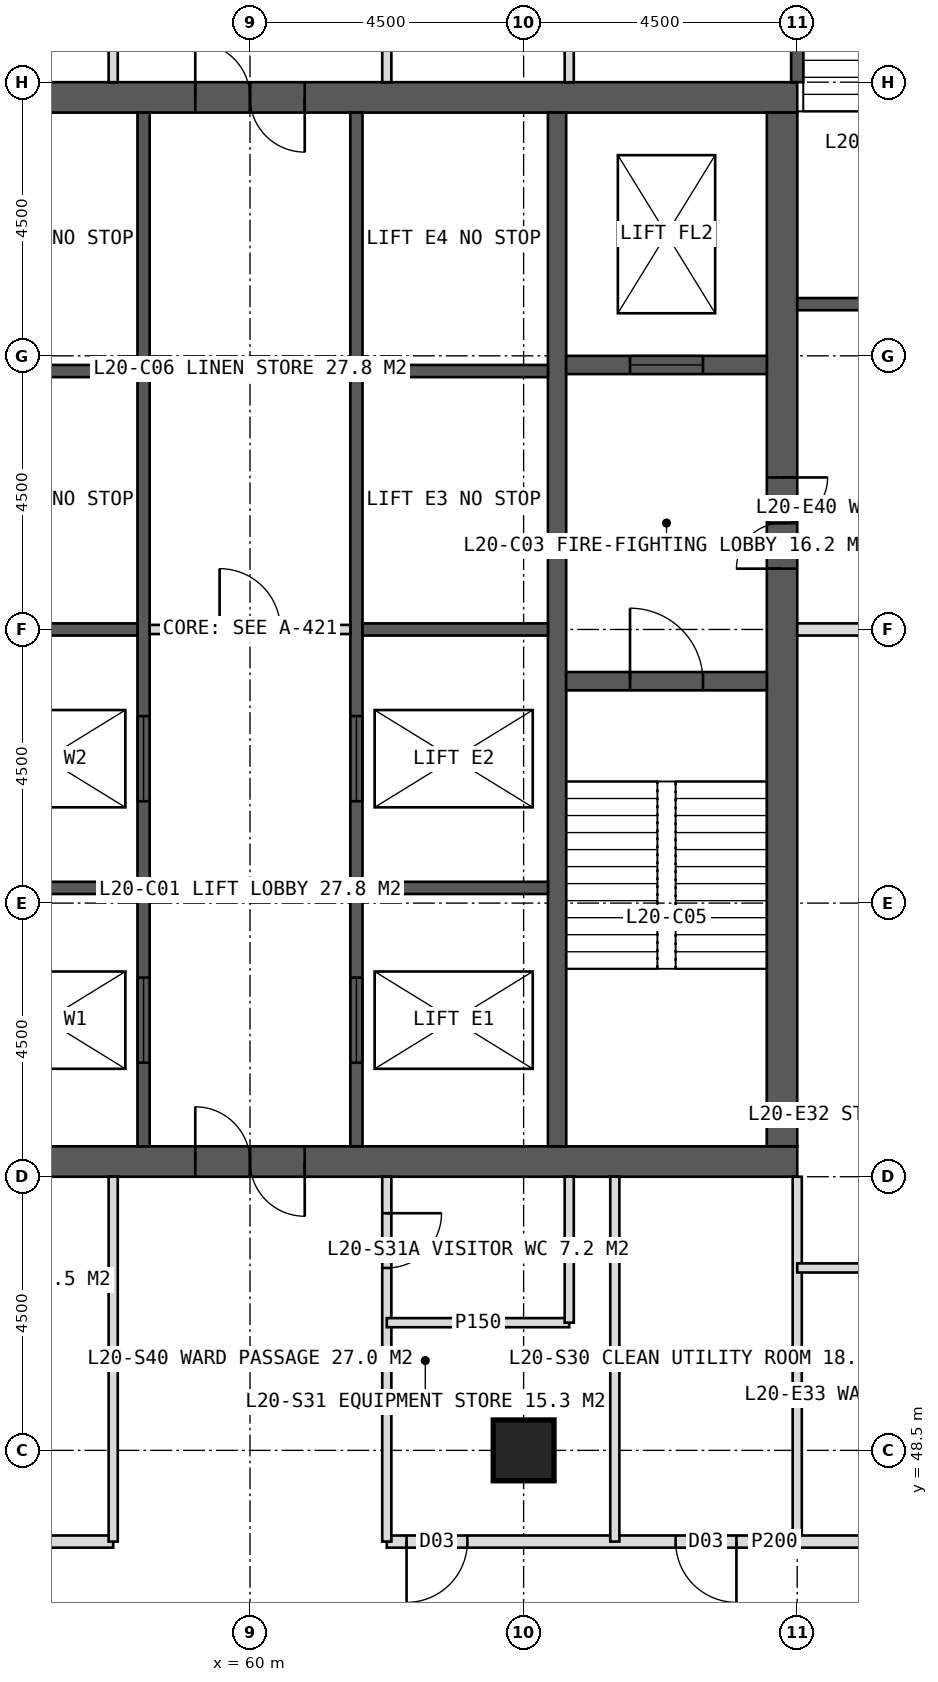
"""IFC4 building model, lengths in metres.
Left out: names, types, materials, properties, quantities, classifications, styles, units other than length and angle.
Written with IfcOpenShell. Run it as: python <this file> out.ifc"""

import sys

from ifc_helpers import new_model, si_unit, direction, frame, frame_2d, origin, origin_2d, place, context, subcontext, project, spatial, rectangle, hollow_rectangle, extrude, element, fill, save


model = new_model("IFC4")
c1 = context("Model", 3, precision=1e-05, world=origin(), true_north=direction((0.0, 1.0)))
c2 = subcontext(c1, "Body", "Model", "MODEL_VIEW")
j1 = project(units=[si_unit("LENGTHUNIT", "METRE"), si_unit("PLANEANGLEUNIT", "RADIAN")], contexts=[c1])
p1 = place(None, origin())
s1 = spatial("IfcSite", under=j1, at=p1, CompositionType="ELEMENT")
p2 = place(p1, origin())
s2 = spatial("IfcBuilding", under=s1, at=p2, CompositionType="ELEMENT")
p3 = place(p2, frame((0.0, 0.0, 87.0)))
s3 = spatial("IfcBuildingStorey", under=s2, at=p3, CompositionType="ELEMENT", Elevation=87.0)
p4 = place(p3, frame((51.0, 70.75, 0.0), z_axis=(0.0, 0.0, 1.0), x_axis=(1.0, 0.0, 0.0)))
e1 = element("IfcWall", 1, at=p4, inside=s3, PredefinedType="SHEAR", context=c2, shape_type="SweptSolid", body=[
    extrude(rectangle(XDim=18.0, YDim=0.5, at=frame_2d((9.0, 0.0))), origin(), (0.0, 0.0, 1.0), 4.0),
])
p5 = place(p4, frame((8.1, 0.0, 0.0)))
e2 = element("IfcOpeningElement", 2, at=p5, cuts=e1, PredefinedType="OPENING", context=c2, shape_type="SweptSolid", body=[
    extrude(rectangle(XDim=1.8, YDim=2.2, at=frame_2d((0.9, 1.1))), frame((0.0, 0.26, 0.0), z_axis=(0.0, -1.0, 0.0), x_axis=(1.0, 0.0, 0.0)), (0.0, 0.0, 1.0), 0.52),
])
p6 = place(p3, frame((51.0, 53.25, 0.0), z_axis=(0.0, 0.0, 1.0), x_axis=(1.0, 0.0, 0.0)))
e3 = element("IfcWall", 3, at=p6, inside=s3, PredefinedType="SHEAR", context=c2, shape_type="SweptSolid", body=[
    extrude(rectangle(XDim=18.0, YDim=0.5, at=frame_2d((9.0, 0.0))), origin(), (0.0, 0.0, 1.0), 4.0),
])
p7 = place(p6, frame((8.1, 0.0, 0.0)))
e4 = element("IfcOpeningElement", 4, at=p7, cuts=e3, PredefinedType="OPENING", context=c2, shape_type="SweptSolid", body=[
    extrude(rectangle(XDim=1.8, YDim=2.2, at=frame_2d((0.9, 1.1))), frame((0.0, 0.26, 0.0), z_axis=(0.0, -1.0, 0.0), x_axis=(1.0, 0.0, 0.0)), (0.0, 0.0, 1.0), 0.52),
])
p8 = place(p3, frame((68.75, 53.5, 0.0), z_axis=(0.0, 0.0, 1.0), x_axis=(0.0, 1.0, 0.0)))
e5 = element("IfcWall", 5, at=p8, inside=s3, PredefinedType="SHEAR", context=c2, shape_type="SweptSolid", body=[
    extrude(rectangle(XDim=17.0, YDim=0.5, at=frame_2d((8.5, 0.0))), origin(), (0.0, 0.0, 1.0), 4.0),
])
p9 = place(p8, frame((9.5, 0.0, 0.0)))
e6 = element("IfcOpeningElement", 6, at=p9, cuts=e5, PredefinedType="OPENING", context=c2, shape_type="SweptSolid", body=[
    extrude(rectangle(XDim=1.5, YDim=2.2, at=frame_2d((0.75, 1.1))), frame((0.0, 0.26, 0.0), z_axis=(0.0, -1.0, 0.0), x_axis=(1.0, 0.0, 0.0)), (0.0, 0.0, 1.0), 0.52),
])
p10 = place(p3, frame((65.05, 53.5, 0.0), z_axis=(0.0, 0.0, 1.0), x_axis=(0.0, 1.0, 0.0)))
e7 = element("IfcWall", 7, at=p10, inside=s3, PredefinedType="SHEAR", context=c2, shape_type="SweptSolid", body=[
    extrude(rectangle(XDim=17.0, YDim=0.3, at=frame_2d((8.5, 0.0))), origin(), (0.0, 0.0, 1.0), 4.0),
])
p11 = place(p3, frame((58.25, 53.5, 0.0), z_axis=(0.0, 0.0, 1.0), x_axis=(0.0, 1.0, 0.0)))
e8 = element("IfcWall", 8, at=p11, inside=s3, PredefinedType="SHEAR", context=c2, shape_type="SweptSolid", body=[
    extrude(rectangle(XDim=17.0, YDim=0.2, at=frame_2d((8.5, 0.0))), origin(), (0.0, 0.0, 1.0), 4.0),
])
p12 = place(p11, frame((1.375, 0.0, 0.0)))
e9 = element("IfcOpeningElement", 9, at=p12, cuts=e8, PredefinedType="OPENING", context=c2, shape_type="SweptSolid", body=[
    extrude(rectangle(XDim=1.4, YDim=2.2, at=frame_2d((0.7, 1.1))), frame((0.0, 0.11, 0.0), z_axis=(0.0, -1.0, 0.0), x_axis=(1.0, 0.0, 0.0)), (0.0, 0.0, 1.0), 0.22),
])
p13 = place(p11, frame((5.675, 0.0, 0.0)))
e10 = element("IfcOpeningElement", 10, at=p13, cuts=e8, PredefinedType="OPENING", context=c2, shape_type="SweptSolid", body=[
    extrude(rectangle(XDim=1.4, YDim=2.2, at=frame_2d((0.7, 1.1))), frame((0.0, 0.11, 0.0), z_axis=(0.0, -1.0, 0.0), x_axis=(1.0, 0.0, 0.0)), (0.0, 0.0, 1.0), 0.22),
])
p14 = place(p3, frame((61.75, 53.5, 0.0), z_axis=(0.0, 0.0, 1.0), x_axis=(0.0, 1.0, 0.0)))
e11 = element("IfcWall", 11, at=p14, inside=s3, PredefinedType="SHEAR", context=c2, shape_type="SweptSolid", body=[
    extrude(rectangle(XDim=17.0, YDim=0.2, at=frame_2d((8.5, 0.0))), origin(), (0.0, 0.0, 1.0), 4.0),
])
p15 = place(p14, frame((1.375, 0.0, 0.0)))
e12 = element("IfcOpeningElement", 12, at=p15, cuts=e11, PredefinedType="OPENING", context=c2, shape_type="SweptSolid", body=[
    extrude(rectangle(XDim=1.4, YDim=2.2, at=frame_2d((0.7, 1.1))), frame((0.0, 0.11, 0.0), z_axis=(0.0, -1.0, 0.0), x_axis=(1.0, 0.0, 0.0)), (0.0, 0.0, 1.0), 0.22),
])
p16 = place(p14, frame((5.675, 0.0, 0.0)))
e13 = element("IfcOpeningElement", 13, at=p16, cuts=e11, PredefinedType="OPENING", context=c2, shape_type="SweptSolid", body=[
    extrude(rectangle(XDim=1.4, YDim=2.2, at=frame_2d((0.7, 1.1))), frame((0.0, 0.11, 0.0), z_axis=(0.0, -1.0, 0.0), x_axis=(1.0, 0.0, 0.0)), (0.0, 0.0, 1.0), 0.22),
])
for number, where, z_axis, x_axis in (
    (14, (55.1, 57.75, 0.0), (0.0, 0.0, 1.0), (1.0, 0.0, 0.0)),
    (15, (61.85, 57.75, 0.0), (0.0, 0.0, 1.0), (1.0, 0.0, 0.0)),
    (16, (55.1, 62.0, 0.0), (0.0, 0.0, 1.0), (1.0, 0.0, 0.0)),
    (17, (61.85, 62.0, 0.0), (0.0, 0.0, 1.0), (1.0, 0.0, 0.0)),
    (18, (55.1, 66.25, 0.0), (0.0, 0.0, 1.0), (1.0, 0.0, 0.0)),
    (19, (61.85, 66.25, 0.0), (0.0, 0.0, 1.0), (1.0, 0.0, 0.0)),
):
    element("IfcWall", number, at=place(p3, frame(where, z_axis=z_axis, x_axis=x_axis)), inside=s3, PredefinedType="SHEAR", context=c2, shape_type="SweptSolid", body=[
        extrude(rectangle(XDim=3.05, YDim=0.2, at=frame_2d((1.525, 0.0))), origin(), (0.0, 0.0, 1.0), 4.0),
    ])
p17 = place(p3, frame((65.2, 61.15, 0.0), z_axis=(0.0, 0.0, 1.0), x_axis=(1.0, 0.0, 0.0)))
e20 = element("IfcWall", 20, at=p17, inside=s3, PredefinedType="SHEAR", context=c2, shape_type="SweptSolid", body=[
    extrude(rectangle(XDim=3.3, YDim=0.3, at=frame_2d((1.65, 0.0))), origin(), (0.0, 0.0, 1.0), 4.0),
])
p18 = place(p17, frame((1.05, 0.0, 0.0)))
e21 = element("IfcOpeningElement", 21, at=p18, cuts=e20, PredefinedType="OPENING", context=c2, shape_type="SweptSolid", body=[
    extrude(rectangle(XDim=1.2, YDim=2.1, at=frame_2d((0.6, 1.05))), frame((0.0, 0.16, 0.0), z_axis=(0.0, -1.0, 0.0), x_axis=(1.0, 0.0, 0.0)), (0.0, 0.0, 1.0), 0.32),
])
p19 = place(p3, frame((65.2, 66.35, 0.0), z_axis=(0.0, 0.0, 1.0), x_axis=(1.0, 0.0, 0.0)))
e22 = element("IfcWall", 22, at=p19, inside=s3, PredefinedType="SHEAR", context=c2, shape_type="SweptSolid", body=[
    extrude(rectangle(XDim=3.3, YDim=0.3, at=frame_2d((1.65, 0.0))), origin(), (0.0, 0.0, 1.0), 4.0),
])
p20 = place(p19, frame((1.05, 0.0, 0.0)))
e23 = element("IfcOpeningElement", 23, at=p20, cuts=e22, PredefinedType="OPENING", context=c2, shape_type="SweptSolid", body=[
    extrude(rectangle(XDim=1.2, YDim=2.2, at=frame_2d((0.6, 1.1))), frame((0.0, 0.16, 0.0), z_axis=(0.0, -1.0, 0.0), x_axis=(1.0, 0.0, 0.0)), (0.0, 0.0, 1.0), 0.32),
])
p21 = place(p3, frame((64.5, 48.5, 0.0), z_axis=(0.0, 0.0, 1.0), x_axis=(1.0, 0.0, 0.0)))
e24 = element("IfcColumn", 24, at=p21, inside=s3, PredefinedType="COLUMN", context=c2, shape_type="SweptSolid", body=[
    extrude(hollow_rectangle(XDim=1.0, YDim=1.0, WallThickness=0.1, at=origin_2d()), origin(), (0.0, 0.0, 1.0), 4.0),
])
p22 = place(p3, frame((57.75, 71.0, 0.0), z_axis=(0.0, 0.0, 1.0), x_axis=(0.0, 1.0, 0.0)))
e25 = element("IfcWall", 25, at=p22, inside=s3, PredefinedType="PARTITIONING", context=c2, shape_type="SweptSolid", body=[
    extrude(rectangle(XDim=6.0, YDim=0.15, at=frame_2d((3.0, 0.0))), origin(), (0.0, 0.0, 1.0), 3.75),
])
p23 = place(p22, frame((0.6, 0.0, 0.0)))
e26 = element("IfcOpeningElement", 26, at=p23, cuts=e25, PredefinedType="OPENING", context=c2, shape_type="SweptSolid", body=[
    extrude(rectangle(XDim=0.9, YDim=2.1, at=frame_2d((0.45, 1.05))), frame((0.0, 0.085, 0.0), z_axis=(0.0, -1.0, 0.0), x_axis=(1.0, 0.0, 0.0)), (0.0, 0.0, 1.0), 0.17),
])
p24 = place(p3, frame((62.25, 71.0, 0.0), z_axis=(0.0, 0.0, 1.0), x_axis=(0.0, 1.0, 0.0)))
e27 = element("IfcWall", 27, at=p24, inside=s3, PredefinedType="PARTITIONING", context=c2, shape_type="SweptSolid", body=[
    extrude(rectangle(XDim=6.0, YDim=0.15, at=frame_2d((3.0, 0.0))), origin(), (0.0, 0.0, 1.0), 3.75),
])
p25 = place(p24, frame((0.6, 0.0, 0.0)))
e28 = element("IfcOpeningElement", 28, at=p25, cuts=e27, PredefinedType="OPENING", context=c2, shape_type="SweptSolid", body=[
    extrude(rectangle(XDim=0.9, YDim=2.1, at=frame_2d((0.45, 1.05))), frame((0.0, 0.085, 0.0), z_axis=(0.0, -1.0, 0.0), x_axis=(1.0, 0.0, 0.0)), (0.0, 0.0, 1.0), 0.17),
])
p26 = place(p3, frame((65.25, 71.0, 0.0), z_axis=(0.0, 0.0, 1.0), x_axis=(0.0, 1.0, 0.0)))
e29 = element("IfcWall", 29, at=p26, inside=s3, PredefinedType="PARTITIONING", context=c2, shape_type="SweptSolid", body=[
    extrude(rectangle(XDim=2.4, YDim=0.15, at=frame_2d((1.2, 0.0))), origin(), (0.0, 0.0, 1.0), 3.75),
])
p27 = place(p3, frame((69.0, 53.0, 0.0), z_axis=(0.0, 0.0, 1.0), x_axis=(0.0, -1.0, 0.0)))
e30 = element("IfcWall", 30, at=p27, inside=s3, PredefinedType="PARTITIONING", context=c2, shape_type="SweptSolid", body=[
    extrude(rectangle(XDim=6.0, YDim=0.15, at=frame_2d((3.0, 0.0))), origin(), (0.0, 0.0, 1.0), 3.75),
])
p28 = place(p3, frame((75.0, 47.0, 0.0), z_axis=(0.0, 0.0, 1.0), x_axis=(-1.0, 0.0, 0.0)))
e31 = element("IfcWall", 31, at=p28, inside=s3, PredefinedType="PARTITIONING", context=c2, shape_type="SweptSolid", body=[
    extrude(rectangle(XDim=12.75, YDim=0.2, at=frame_2d((6.375, 0.0))), origin(), (0.0, 0.0, 1.0), 3.75),
])
p29 = place(p28, frame((7.0, 0.0, 0.0)))
e32 = element("IfcOpeningElement", 32, at=p29, cuts=e31, PredefinedType="OPENING", context=c2, shape_type="SweptSolid", body=[
    extrude(rectangle(XDim=1.0, YDim=2.1, at=frame_2d((0.5, 1.05))), frame((0.0, 0.11, 0.0), z_axis=(0.0, -1.0, 0.0), x_axis=(1.0, 0.0, 0.0)), (0.0, 0.0, 1.0), 0.22),
])
p30 = place(p28, frame((11.425, 0.0, 0.0)))
e33 = element("IfcOpeningElement", 33, at=p30, cuts=e31, PredefinedType="OPENING", context=c2, shape_type="SweptSolid", body=[
    extrude(rectangle(XDim=1.0, YDim=2.1, at=frame_2d((0.5, 1.05))), frame((0.0, 0.11, 0.0), z_axis=(0.0, -1.0, 0.0), x_axis=(1.0, 0.0, 0.0)), (0.0, 0.0, 1.0), 0.22),
])
p31 = place(p3, frame((57.75, 47.0, 0.0), z_axis=(0.0, 0.0, 1.0), x_axis=(-1.0, 0.0, 0.0)))
e34 = element("IfcWall", 34, at=p31, inside=s3, PredefinedType="PARTITIONING", context=c2, shape_type="SweptSolid", body=[
    extrude(rectangle(XDim=12.75, YDim=0.2, at=frame_2d((6.375, 0.0))), origin(), (0.0, 0.0, 1.0), 3.75),
])
p32 = place(p31, frame((3.55, 0.0, 0.0)))
e35 = element("IfcOpeningElement", 35, at=p32, cuts=e34, PredefinedType="OPENING", context=c2, shape_type="SweptSolid", body=[
    extrude(rectangle(XDim=1.0, YDim=2.1, at=frame_2d((0.5, 1.05))), frame((0.0, 0.11, 0.0), z_axis=(0.0, -1.0, 0.0), x_axis=(1.0, 0.0, 0.0)), (0.0, 0.0, 1.0), 0.22),
])
p33 = place(p31, frame((8.5, 0.0, 0.0)))
e36 = element("IfcOpeningElement", 36, at=p33, cuts=e34, PredefinedType="OPENING", context=c2, shape_type="SweptSolid", body=[
    extrude(rectangle(XDim=1.0, YDim=2.1, at=frame_2d((0.5, 1.05))), frame((0.0, 0.11, 0.0), z_axis=(0.0, -1.0, 0.0), x_axis=(1.0, 0.0, 0.0)), (0.0, 0.0, 1.0), 0.22),
])
p34 = place(p3, frame((62.25, 53.0, 0.0), z_axis=(0.0, 0.0, 1.0), x_axis=(0.0, -1.0, 0.0)))
e37 = element("IfcWall", 37, at=p34, inside=s3, PredefinedType="PARTITIONING", context=c2, shape_type="SweptSolid", body=[
    extrude(rectangle(XDim=6.0, YDim=0.15, at=frame_2d((3.0, 0.0))), origin(), (0.0, 0.0, 1.0), 3.75),
])
p35 = place(p34, frame((0.6, 0.0, 0.0)))
e38 = element("IfcOpeningElement", 38, at=p35, cuts=e37, PredefinedType="OPENING", context=c2, shape_type="SweptSolid", body=[
    extrude(rectangle(XDim=0.9, YDim=2.1, at=frame_2d((0.45, 1.05))), frame((0.0, 0.085, 0.0), z_axis=(0.0, -1.0, 0.0), x_axis=(1.0, 0.0, 0.0)), (0.0, 0.0, 1.0), 0.17),
])
for number, where, z_axis, x_axis in (
    (39, (57.75, 53.0, 0.0), (0.0, 0.0, 1.0), (0.0, -1.0, 0.0)),
    (40, (66.0, 53.0, 0.0), (0.0, 0.0, 1.0), (0.0, -1.0, 0.0)),
):
    element("IfcWall", number, at=place(p3, frame(where, z_axis=z_axis, x_axis=x_axis)), inside=s3, PredefinedType="PARTITIONING", context=c2, shape_type="SweptSolid", body=[
        extrude(rectangle(XDim=6.0, YDim=0.15, at=frame_2d((3.0, 0.0))), origin(), (0.0, 0.0, 1.0), 3.75),
    ])
p36 = place(p3, frame((65.25, 50.6, 0.0), z_axis=(0.0, 0.0, 1.0), x_axis=(-1.0, 0.0, 0.0)))
e41 = element("IfcWall", 41, at=p36, inside=s3, PredefinedType="PARTITIONING", context=c2, shape_type="SweptSolid", body=[
    extrude(rectangle(XDim=3.0, YDim=0.15, at=frame_2d((1.5, 0.0))), origin(), (0.0, 0.0, 1.0), 3.75),
])
p37 = place(p3, frame((65.25, 53.0, 0.0), z_axis=(0.0, 0.0, 1.0), x_axis=(0.0, -1.0, 0.0)))
e42 = element("IfcWall", 42, at=p37, inside=s3, PredefinedType="PARTITIONING", context=c2, shape_type="SweptSolid", body=[
    extrude(rectangle(XDim=2.4, YDim=0.15, at=frame_2d((1.2, 0.0))), origin(), (0.0, 0.0, 1.0), 3.75),
])
p38 = place(p3, frame((69.0, 62.0, 0.0), z_axis=(0.0, 0.0, 1.0), x_axis=(1.0, 0.0, 0.0)))
e43 = element("IfcWall", 43, at=p38, inside=s3, PredefinedType="SOLIDWALL", context=c2, shape_type="SweptSolid", body=[
    extrude(rectangle(XDim=6.0, YDim=0.2, at=frame_2d((3.0, 0.0))), origin(), (0.0, 0.0, 1.0), 2.75),
])
p39 = place(p3, frame((69.0, 51.5, 0.0), z_axis=(0.0, 0.0, 1.0), x_axis=(1.0, 0.0, 0.0)))
e44 = element("IfcWall", 44, at=p39, inside=s3, PredefinedType="PARTITIONING", context=c2, shape_type="SweptSolid", body=[
    extrude(rectangle(XDim=6.0, YDim=0.15, at=frame_2d((3.0, 0.0))), origin(), (0.0, 0.0, 1.0), 3.75),
])
p40 = place(p3, frame((58.35, 62.0, 0.0), z_axis=(0.0, 0.0, 1.0), x_axis=(1.0, 0.0, 0.0)))
e45 = element("IfcWall", 45, at=p40, inside=s3, PredefinedType="PARTITIONING", context=c2, shape_type="SweptSolid", body=[
    extrude(rectangle(XDim=3.3, YDim=0.15, at=frame_2d((1.65, 0.0))), origin(), (0.0, 0.0, 1.0), 3.75),
])
p41 = place(p40, frame((1.15, 0.0, 0.0)))
e46 = element("IfcOpeningElement", 46, at=p41, cuts=e45, PredefinedType="OPENING", context=c2, shape_type="SweptSolid", body=[
    extrude(rectangle(XDim=1.0, YDim=2.1, at=frame_2d((0.5, 1.05))), frame((0.0, 0.085, 0.0), z_axis=(0.0, -1.0, 0.0), x_axis=(1.0, 0.0, 0.0)), (0.0, 0.0, 1.0), 0.17),
])
p42 = place(p3, frame((69.0, 71.0, 0.0), z_axis=(0.0, 0.0, 1.0), x_axis=(0.0, 1.0, 0.0)))
e47 = element("IfcWall", 47, at=p42, inside=s3, PredefinedType="SOLIDWALL", context=c2, shape_type="SweptSolid", body=[
    extrude(rectangle(XDim=4.1, YDim=0.2, at=frame_2d((2.05, 0.0))), origin(), (0.0, 0.0, 1.0), 3.75),
])
p43 = place(p3, frame((69.0, 67.35, 0.0), z_axis=(0.0, 0.0, 1.0), x_axis=(1.0, 0.0, 0.0)))
e48 = element("IfcWall", 48, at=p43, inside=s3, PredefinedType="SOLIDWALL", context=c2, shape_type="SweptSolid", body=[
    extrude(rectangle(XDim=3.5, YDim=0.2, at=frame_2d((1.75, 0.0))), origin(), (0.0, 0.0, 1.0), 3.75),
])
p44 = place(p29, origin())
e49 = element("IfcDoor", 49, at=p44, inside=s3, OperationType="SINGLE_SWING_LEFT", PredefinedType="DOOR", context=c2, shape_type="SweptSolid", body=[
    extrude(rectangle(XDim=1.0, YDim=2.1, at=frame_2d((0.5, 1.05))), frame((0.0, 0.025, 0.0), z_axis=(0.0, -1.0, 0.0), x_axis=(1.0, 0.0, 0.0)), (0.0, 0.0, 1.0), 0.05),
])
fill(e32, e49)
p45 = place(p35, origin())
e50 = element("IfcDoor", 50, at=p45, inside=s3, OperationType="SINGLE_SWING_LEFT", PredefinedType="DOOR", context=c2, shape_type="SweptSolid", body=[
    extrude(rectangle(XDim=0.9, YDim=2.1, at=frame_2d((0.45, 1.05))), frame((0.0, 0.025, 0.0), z_axis=(0.0, -1.0, 0.0), x_axis=(1.0, 0.0, 0.0)), (0.0, 0.0, 1.0), 0.05),
])
fill(e38, e50)
p46 = place(p30, origin())
e51 = element("IfcDoor", 51, at=p46, inside=s3, OperationType="SINGLE_SWING_RIGHT", PredefinedType="DOOR", context=c2, shape_type="SweptSolid", body=[
    extrude(rectangle(XDim=1.0, YDim=2.1, at=frame_2d((0.5, 1.05))), frame((0.0, 0.025, 0.0), z_axis=(0.0, -1.0, 0.0), x_axis=(1.0, 0.0, 0.0)), (0.0, 0.0, 1.0), 0.05),
])
fill(e33, e51)
p47 = place(p7, origin())
e52 = element("IfcDoor", 52, at=p47, inside=s3, OperationType="DOUBLE_DOOR_SINGLE_SWING", PredefinedType="DOOR", context=c2, shape_type="SweptSolid", body=[
    extrude(rectangle(XDim=1.8, YDim=2.2, at=frame_2d((0.9, 1.1))), frame((0.0, 0.025, 0.0), z_axis=(0.0, -1.0, 0.0), x_axis=(1.0, 0.0, 0.0)), (0.0, 0.0, 1.0), 0.05),
])
fill(e4, e52)
p48 = place(p9, origin())
e53 = element("IfcDoor", 53, at=p48, inside=s3, OperationType="DOUBLE_DOOR_SINGLE_SWING", PredefinedType="DOOR", context=c2, shape_type="SweptSolid", body=[
    extrude(rectangle(XDim=1.5, YDim=2.2, at=frame_2d((0.75, 1.1))), frame((0.0, 0.025, 0.0), z_axis=(0.0, -1.0, 0.0), x_axis=(1.0, 0.0, 0.0)), (0.0, 0.0, 1.0), 0.05),
])
fill(e6, e53)
p49 = place(p18, origin())
e54 = element("IfcDoor", 54, at=p49, inside=s3, OperationType="SINGLE_SWING_LEFT", PredefinedType="DOOR", context=c2, shape_type="SweptSolid", body=[
    extrude(rectangle(XDim=1.2, YDim=2.1, at=frame_2d((0.6, 1.05))), frame((0.0, 0.025, 0.0), z_axis=(0.0, -1.0, 0.0), x_axis=(1.0, 0.0, 0.0)), (0.0, 0.0, 1.0), 0.05),
])
fill(e21, e54)
p50 = place(p20, origin())
e55 = element("IfcDoor", 55, at=p50, inside=s3, OperationType="SLIDING_TO_LEFT", PredefinedType="DOOR", context=c2, shape_type="SweptSolid", body=[
    extrude(rectangle(XDim=1.2, YDim=2.2, at=frame_2d((0.6, 1.1))), frame((0.0, 0.025, 0.0), z_axis=(0.0, -1.0, 0.0), x_axis=(1.0, 0.0, 0.0)), (0.0, 0.0, 1.0), 0.05),
])
fill(e23, e55)
p51 = place(p12, origin())
e56 = element("IfcDoor", 56, at=p51, inside=s3, OperationType="SLIDING_TO_LEFT", PredefinedType="DOOR", context=c2, shape_type="SweptSolid", body=[
    extrude(rectangle(XDim=1.4, YDim=2.2, at=frame_2d((0.7, 1.1))), frame((0.0, 0.025, 0.0), z_axis=(0.0, -1.0, 0.0), x_axis=(1.0, 0.0, 0.0)), (0.0, 0.0, 1.0), 0.05),
])
fill(e9, e56)
p52 = place(p15, origin())
e57 = element("IfcDoor", 57, at=p52, inside=s3, OperationType="SLIDING_TO_LEFT", PredefinedType="DOOR", context=c2, shape_type="SweptSolid", body=[
    extrude(rectangle(XDim=1.4, YDim=2.2, at=frame_2d((0.7, 1.1))), frame((0.0, 0.025, 0.0), z_axis=(0.0, -1.0, 0.0), x_axis=(1.0, 0.0, 0.0)), (0.0, 0.0, 1.0), 0.05),
])
fill(e12, e57)
p53 = place(p13, origin())
e58 = element("IfcDoor", 58, at=p53, inside=s3, OperationType="SLIDING_TO_LEFT", PredefinedType="DOOR", context=c2, shape_type="SweptSolid", body=[
    extrude(rectangle(XDim=1.4, YDim=2.2, at=frame_2d((0.7, 1.1))), frame((0.0, 0.025, 0.0), z_axis=(0.0, -1.0, 0.0), x_axis=(1.0, 0.0, 0.0)), (0.0, 0.0, 1.0), 0.05),
])
fill(e10, e58)
p54 = place(p16, origin())
e59 = element("IfcDoor", 59, at=p54, inside=s3, OperationType="SLIDING_TO_LEFT", PredefinedType="DOOR", context=c2, shape_type="SweptSolid", body=[
    extrude(rectangle(XDim=1.4, YDim=2.2, at=frame_2d((0.7, 1.1))), frame((0.0, 0.025, 0.0), z_axis=(0.0, -1.0, 0.0), x_axis=(1.0, 0.0, 0.0)), (0.0, 0.0, 1.0), 0.05),
])
fill(e13, e59)
p55 = place(p41, origin())
e60 = element("IfcDoor", 60, at=p55, inside=s3, OperationType="SINGLE_SWING_LEFT", PredefinedType="DOOR", context=c2, shape_type="SweptSolid", body=[
    extrude(rectangle(XDim=1.0, YDim=2.1, at=frame_2d((0.5, 1.05))), frame((0.0, 0.025, 0.0), z_axis=(0.0, -1.0, 0.0), x_axis=(1.0, 0.0, 0.0)), (0.0, 0.0, 1.0), 0.05),
])
fill(e46, e60)
p56 = place(p5, origin())
e61 = element("IfcDoor", 61, at=p56, inside=s3, OperationType="DOUBLE_DOOR_SINGLE_SWING", PredefinedType="DOOR", context=c2, shape_type="SweptSolid", body=[
    extrude(rectangle(XDim=1.8, YDim=2.2, at=frame_2d((0.9, 1.1))), frame((0.0, 0.025, 0.0), z_axis=(0.0, -1.0, 0.0), x_axis=(1.0, 0.0, 0.0)), (0.0, 0.0, 1.0), 0.05),
])
fill(e2, e61)
save(model, sys.argv[1])
